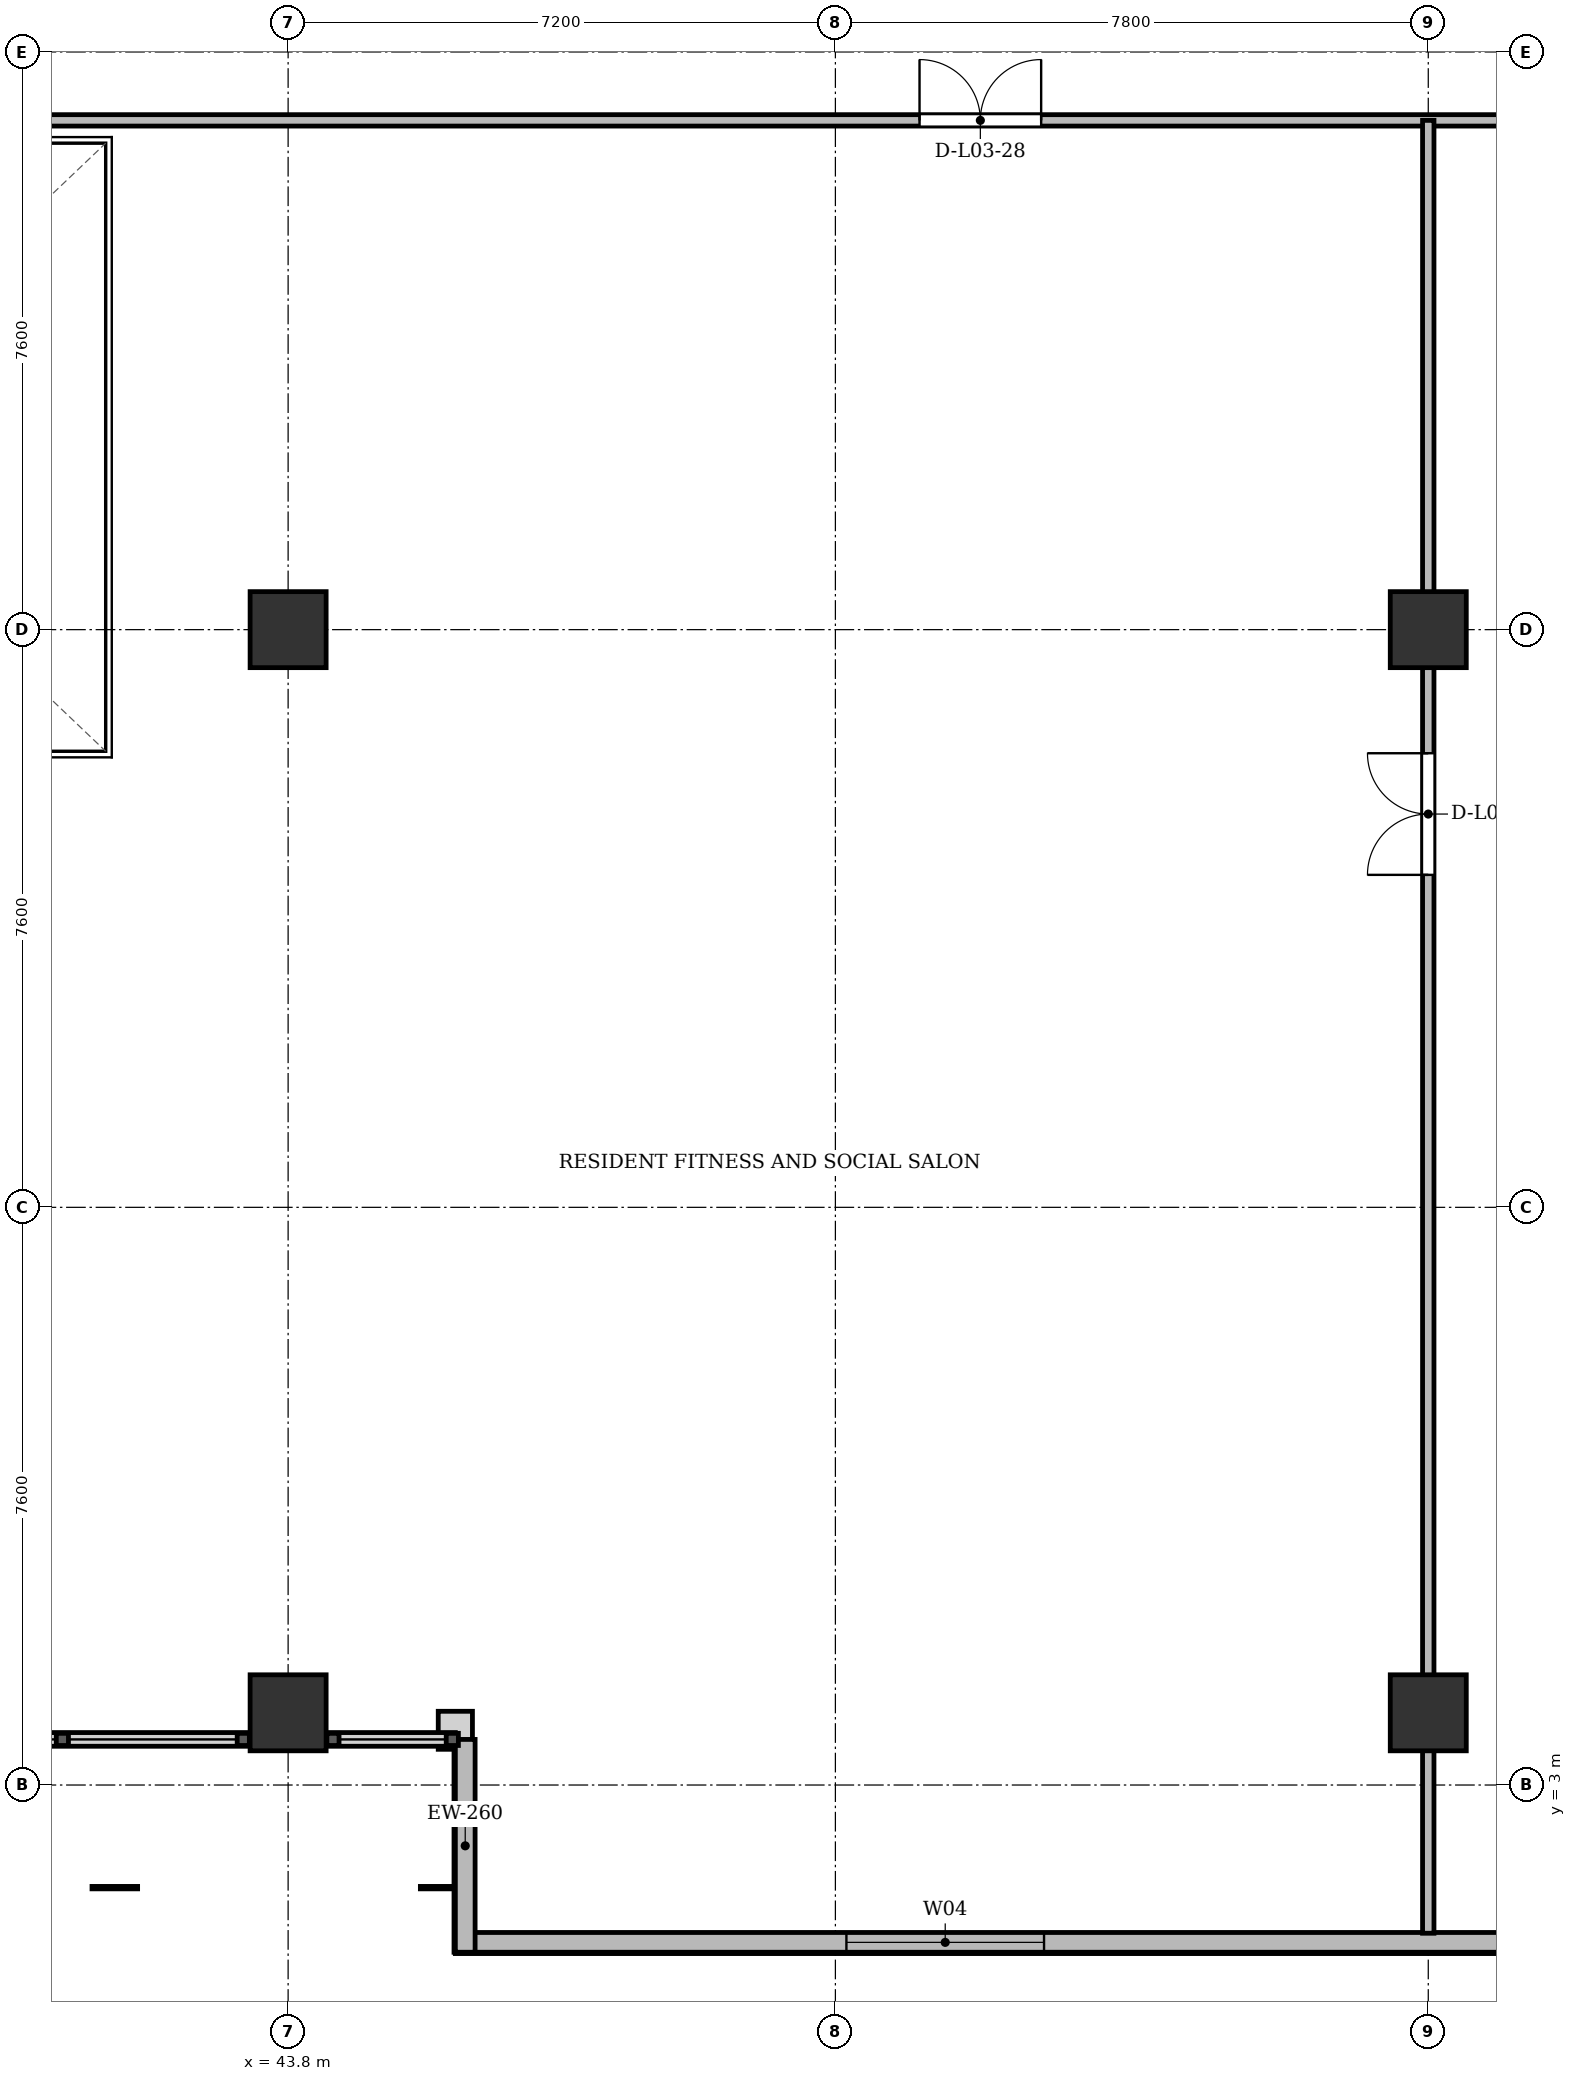
"""IFC4 building model, lengths in metres.
Left out: names, types, materials, properties, quantities, classifications, styles, units other than length and angle.
Written with IfcOpenShell. Run it as: python <this file> out.ifc"""

import sys

from ifc_helpers import new_model, si_unit, direction, frame, frame_2d, origin, origin_2d, place, context, subcontext, project, spatial, rectangle, extrude, source, transform, mapped, element, fill, save


model = new_model("IFC4")
c1 = context("Model", 3, precision=1e-05, world=origin(), true_north=direction((0.0, 1.0)))
c2 = subcontext(c1, "Body", "Model", "MODEL_VIEW")
j1 = project(units=[si_unit("LENGTHUNIT", "METRE"), si_unit("PLANEANGLEUNIT", "RADIAN")], contexts=[c1])
p1 = place(None, origin())
s1 = spatial("IfcSite", under=j1, at=p1, CompositionType="ELEMENT")
p2 = place(p1, origin())
s2 = spatial("IfcBuilding", under=s1, at=p2, CompositionType="ELEMENT")
p3 = place(p2, frame((0.0, 0.0, 14.2)))
s3 = spatial("IfcBuildingStorey", under=s2, at=p3, CompositionType="ELEMENT", Elevation=14.2)
m1 = source(origin(), c2, "Body", "SweptSolid", [
    extrude(rectangle(XDim=1.0, YDim=1.0, at=origin_2d()), origin(), (0.0, 0.0, 1.0), 4.5),
])
for number, where, z_axis, x_axis in (
    (1, (43.8, 3.95, 0.0), (0.0, 0.0, 1.0), (1.0, 0.0, 0.0)),
    (2, (43.8, 18.2, 0.0), (0.0, 0.0, 1.0), (1.0, 0.0, 0.0)),
    (3, (58.8, 3.95, 0.0), (0.0, 0.0, 1.0), (1.0, 0.0, 0.0)),
    (4, (58.8, 18.2, 0.0), (0.0, 0.0, 1.0), (1.0, 0.0, 0.0)),
):
    element("IfcColumn", number, at=place(p3, frame(where, z_axis=z_axis, x_axis=x_axis)), inside=s3, PredefinedType="COLUMN", context=c2, shape_type="MappedRepresentation", body=[
        mapped(m1, transform((0.0, 0.0, 0.0), x_axis=(1.0, 0.0, 0.0), y_axis=(0.0, 1.0, 0.0), z_axis=(0.0, 0.0, 1.0), scale=1.0)),
    ])
p4 = place(p3, frame((76.4, 0.93, 0.0), z_axis=(0.0, 0.0, 1.0), x_axis=(-1.0, 0.0, 0.0)))
e5 = element("IfcWall", 5, at=p4, inside=s3, PredefinedType="SOLIDWALL", context=c2, shape_type="SweptSolid", body=[
    extrude(rectangle(XDim=30.4, YDim=0.26, at=frame_2d((15.2, 0.0))), origin(), (0.0, 0.0, 1.0), 4.15),
])
p5 = place(p4, frame((7.645, 0.0, 0.9)))
e6 = element("IfcOpeningElement", 6, at=p5, cuts=e5, PredefinedType="OPENING", context=c2, shape_type="SweptSolid", body=[
    extrude(rectangle(XDim=2.4, YDim=2.1, at=frame_2d((1.2, 1.05))), frame((0.0, 0.14, 0.0), z_axis=(0.0, -1.0, 0.0), x_axis=(1.0, 0.0, 0.0)), (0.0, 0.0, 1.0), 0.28),
])
p6 = place(p4, frame((22.655, 0.0, 0.9)))
e7 = element("IfcOpeningElement", 7, at=p6, cuts=e5, PredefinedType="OPENING", context=c2, shape_type="SweptSolid", body=[
    extrude(rectangle(XDim=2.6, YDim=1.9, at=frame_2d((1.3, 0.95))), frame((0.0, 0.14, 0.0), z_axis=(0.0, -1.0, 0.0), x_axis=(1.0, 0.0, 0.0)), (0.0, 0.0, 1.0), 0.28),
])
p7 = place(p3, frame((46.13, 0.8, 0.0), z_axis=(0.0, 0.0, 1.0), x_axis=(0.0, 1.0, 0.0)))
e8 = element("IfcWall", 8, at=p7, inside=s3, PredefinedType="SOLIDWALL", context=c2, shape_type="SweptSolid", body=[
    extrude(rectangle(XDim=2.8, YDim=0.26, at=frame_2d((1.4, 0.0))), origin(), (0.0, 0.0, 1.0), 4.15),
])
p8 = place(p3, frame((-1.75, 24.9, 0.0), z_axis=(0.0, 0.0, 1.0), x_axis=(1.0, 0.0, 0.0)))
e9 = element("IfcWall", 9, at=p8, inside=s3, PredefinedType="PARTITIONING", context=c2, shape_type="SweptSolid", body=[
    extrude(rectangle(XDim=77.9, YDim=0.15, at=frame_2d((38.95, 0.0))), origin(), (0.0, 0.0, 1.0), 3.35),
])
p9 = place(p8, frame((1.952, 0.0, 0.0)))
e10 = element("IfcOpeningElement", 10, at=p9, cuts=e9, PredefinedType="OPENING", context=c2, shape_type="SweptSolid", body=[
    extrude(rectangle(XDim=1.6, YDim=2.2, at=frame_2d((0.8, 1.1))), frame((0.0, 0.085, 0.0), z_axis=(0.0, -1.0, 0.0), x_axis=(1.0, 0.0, 0.0)), (0.0, 0.0, 1.0), 0.17),
])
p10 = place(p8, frame((18.14, 0.0, 0.0)))
e11 = element("IfcOpeningElement", 11, at=p10, cuts=e9, PredefinedType="OPENING", context=c2, shape_type="SweptSolid", body=[
    extrude(rectangle(XDim=1.6, YDim=2.2, at=frame_2d((0.8, 1.1))), frame((0.0, 0.085, 0.0), z_axis=(0.0, -1.0, 0.0), x_axis=(1.0, 0.0, 0.0)), (0.0, 0.0, 1.0), 0.17),
])
p11 = place(p8, frame((28.71, 0.0, 0.0)))
e12 = element("IfcOpeningElement", 12, at=p11, cuts=e9, PredefinedType="OPENING", context=c2, shape_type="SweptSolid", body=[
    extrude(rectangle(XDim=1.6, YDim=2.2, at=frame_2d((0.8, 1.1))), frame((0.0, 0.085, 0.0), z_axis=(0.0, -1.0, 0.0), x_axis=(1.0, 0.0, 0.0)), (0.0, 0.0, 1.0), 0.17),
])
p12 = place(p8, frame((53.857, 0.0, 0.0)))
e13 = element("IfcOpeningElement", 13, at=p12, cuts=e9, PredefinedType="OPENING", context=c2, shape_type="SweptSolid", body=[
    extrude(rectangle(XDim=1.6, YDim=2.2, at=frame_2d((0.8, 1.1))), frame((0.0, 0.085, 0.0), z_axis=(0.0, -1.0, 0.0), x_axis=(1.0, 0.0, 0.0)), (0.0, 0.0, 1.0), 0.17),
])
p13 = place(p8, frame((74.351, 0.0, 0.0)))
e14 = element("IfcOpeningElement", 14, at=p13, cuts=e9, PredefinedType="OPENING", context=c2, shape_type="SweptSolid", body=[
    extrude(rectangle(XDim=1.6, YDim=2.2, at=frame_2d((0.8, 1.1))), frame((0.0, 0.085, 0.0), z_axis=(0.0, -1.0, 0.0), x_axis=(1.0, 0.0, 0.0)), (0.0, 0.0, 1.0), 0.17),
])
p14 = place(p3, frame((58.8, 1.05, 0.0), z_axis=(0.0, 0.0, 1.0), x_axis=(0.0, 1.0, 0.0)))
e15 = element("IfcWall", 15, at=p14, inside=s3, PredefinedType="PARTITIONING", context=c2, shape_type="SweptSolid", body=[
    extrude(rectangle(XDim=23.85, YDim=0.15, at=frame_2d((11.925, 0.0))), origin(), (0.0, 0.0, 1.0), 3.35),
])
p15 = place(p14, frame((13.924, 0.0, 0.0)))
e16 = element("IfcOpeningElement", 16, at=p15, cuts=e15, PredefinedType="OPENING", context=c2, shape_type="SweptSolid", body=[
    extrude(rectangle(XDim=1.6, YDim=2.2, at=frame_2d((0.8, 1.1))), frame((0.0, 0.085, 0.0), z_axis=(0.0, -1.0, 0.0), x_axis=(1.0, 0.0, 0.0)), (0.0, 0.0, 1.0), 0.17),
])
m2 = source(origin(), c2, "Body", "SweptSolid", [
    extrude(rectangle(XDim=2.6, YDim=1.9, at=frame_2d((1.3, 0.95))), frame((0.0, 0.03, 0.0), z_axis=(0.0, -1.0, 0.0), x_axis=(1.0, 0.0, 0.0)), (0.0, 0.0, 1.0), 0.06),
])
p16 = place(p6, origin())
e17 = element("IfcWindow", 17, at=p16, inside=s3, PartitioningType="SINGLE_PANEL", PredefinedType="WINDOW", context=c2, shape_type="MappedRepresentation", body=[
    mapped(m2, transform((0.0, 0.0, 0.0), x_axis=(1.0, 0.0, 0.0), y_axis=(0.0, 1.0, 0.0), z_axis=(0.0, 0.0, 1.0), scale=1.0)),
])
fill(e7, e17)
m3 = source(origin(), c2, "Body", "SweptSolid", [
    extrude(rectangle(XDim=1.6, YDim=2.2, at=frame_2d((0.8, 1.1))), frame((0.0, 0.025, 0.0), z_axis=(0.0, -1.0, 0.0), x_axis=(1.0, 0.0, 0.0)), (0.0, 0.0, 1.0), 0.05),
])
p17 = place(p12, origin())
e18 = element("IfcDoor", 18, at=p17, inside=s3, OperationType="DOUBLE_DOOR_SINGLE_SWING", PredefinedType="DOOR", context=c2, shape_type="MappedRepresentation", body=[
    mapped(m3, transform((0.0, 0.0, 0.0), x_axis=(1.0, 0.0, 0.0), y_axis=(0.0, 1.0, 0.0), z_axis=(0.0, 0.0, 1.0), scale=1.0)),
])
fill(e13, e18)
p18 = place(p15, origin())
e19 = element("IfcDoor", 19, at=p18, inside=s3, OperationType="DOUBLE_DOOR_SINGLE_SWING", PredefinedType="DOOR", context=c2, shape_type="MappedRepresentation", body=[
    mapped(m3, transform((0.0, 0.0, 0.0), x_axis=(1.0, 0.0, 0.0), y_axis=(0.0, 1.0, 0.0), z_axis=(0.0, 0.0, 1.0), scale=1.0)),
])
fill(e16, e19)
save(model, sys.argv[1])
